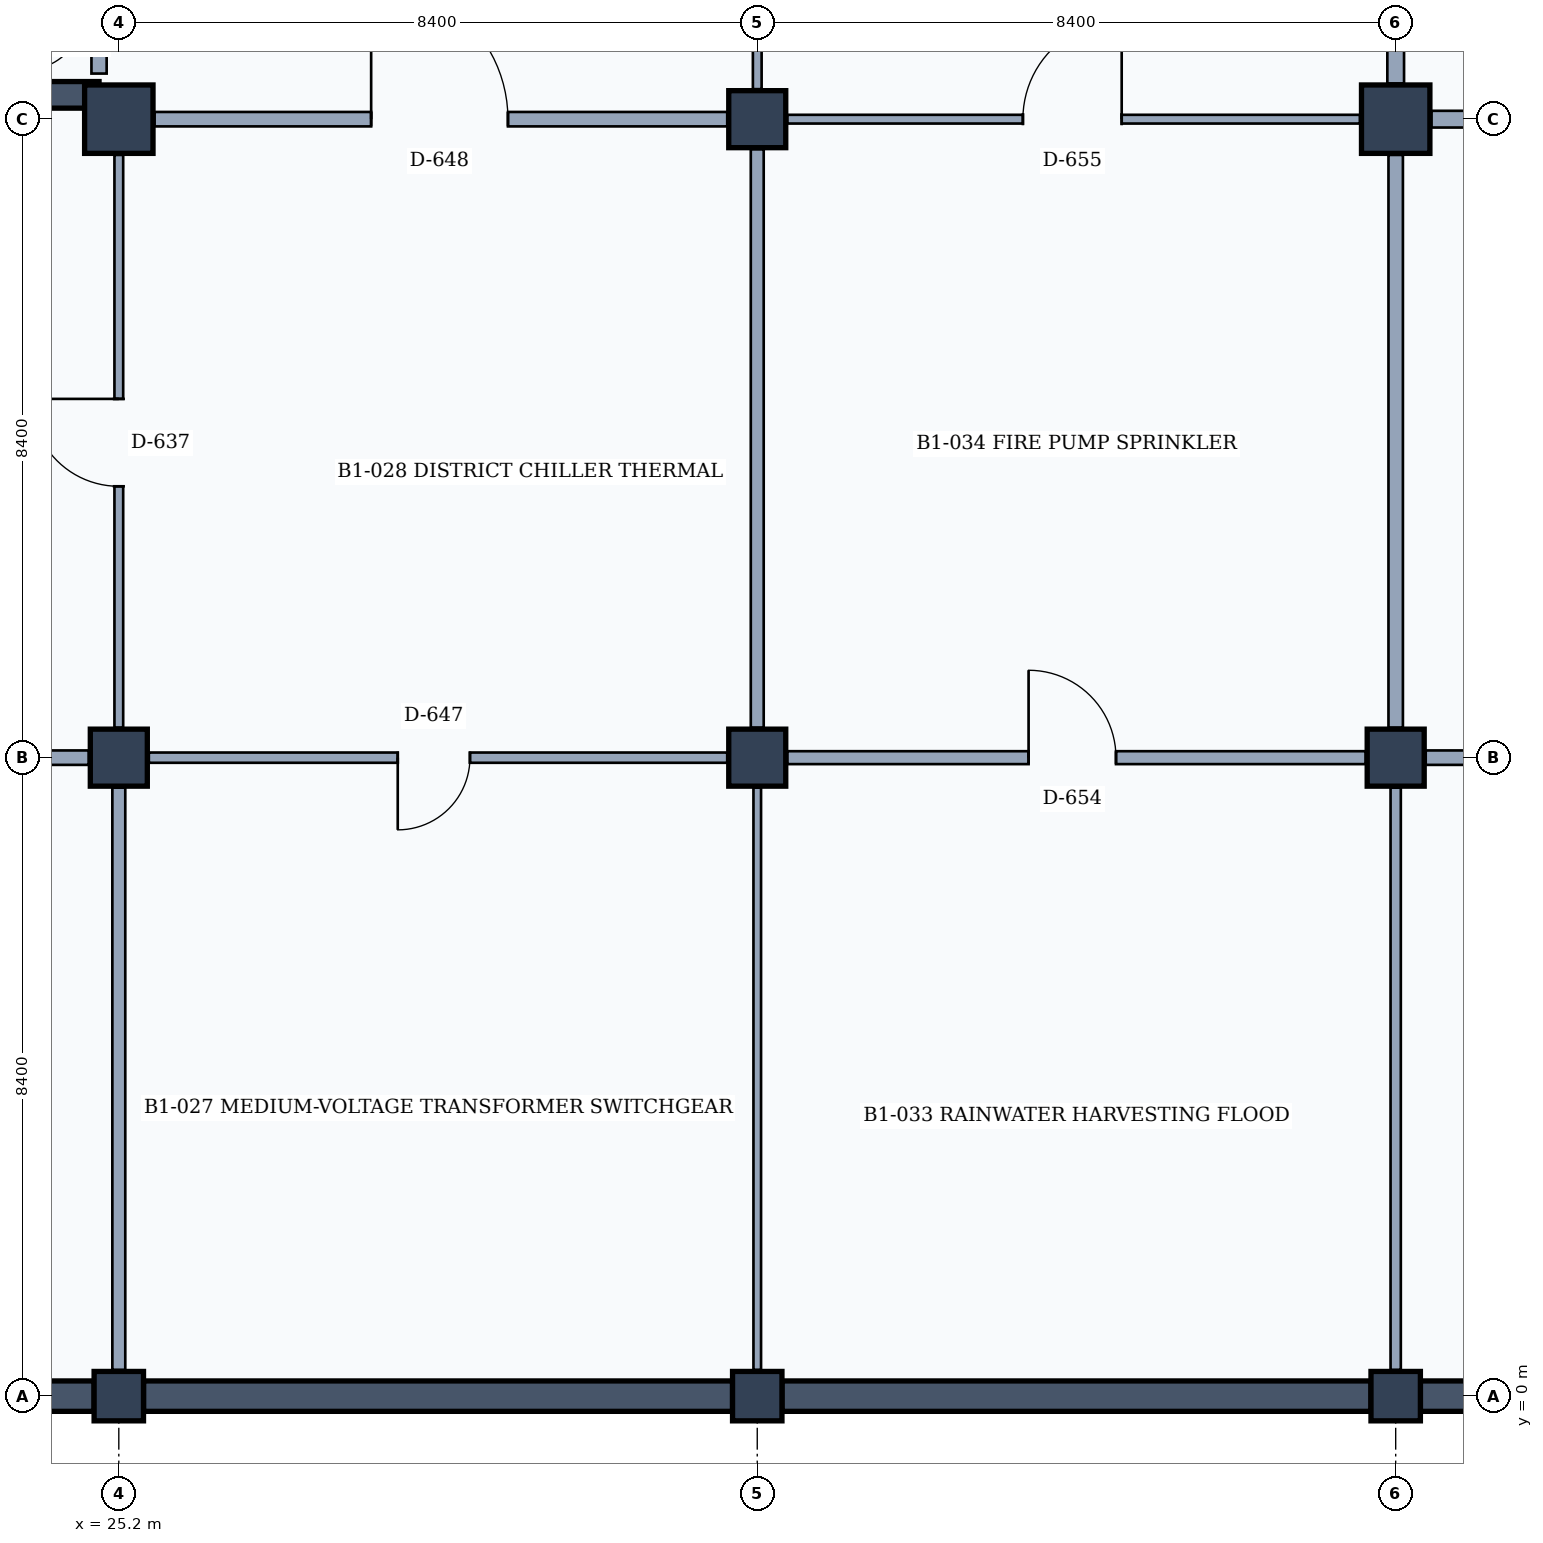
"""IFC4 building model, lengths in metres.
Left out: names, types, materials, properties, quantities, classifications, styles, units other than length and angle.
Written with IfcOpenShell. Run it as: python <this file> out.ifc"""

import sys

from ifc_helpers import new_model, si_unit, direction, frame, frame_2d, origin, origin_2d, place, context, subcontext, project, spatial, rectangle, extrude, element, fill, save


model = new_model("IFC4")
c1 = context("Model", 3, precision=1e-05, world=origin(), true_north=direction((0.0, 1.0)))
c2 = subcontext(c1, "Body", "Model", "MODEL_VIEW")
j1 = project(units=[si_unit("LENGTHUNIT", "METRE"), si_unit("PLANEANGLEUNIT", "RADIAN")], contexts=[c1])
p1 = place(None, origin())
s1 = spatial("IfcSite", under=j1, at=p1, CompositionType="ELEMENT")
p2 = place(p1, origin())
s2 = spatial("IfcBuilding", under=s1, at=p2, CompositionType="ELEMENT")
p3 = place(p2, frame((0.0, 0.0, -4.2)))
s3 = spatial("IfcBuildingStorey", under=s2, at=p3, CompositionType="ELEMENT", Elevation=-4.2)
p4 = place(p3, frame((25.2, 0.0, 0.0), z_axis=(0.0, 0.0, 1.0), x_axis=(1.0, 0.0, 0.0)))
e1 = element("IfcColumn", 1, at=p4, inside=s3, PredefinedType="COLUMN", context=c2, shape_type="SweptSolid", body=[
    extrude(rectangle(XDim=0.65, YDim=0.65, at=origin_2d()), origin(), (0.0, 0.0, 1.0), 4.2),
])
p5 = place(p3, frame((25.2, 8.4, 0.0), z_axis=(0.0, 0.0, 1.0), x_axis=(1.0, 0.0, 0.0)))
e2 = element("IfcColumn", 2, at=p5, inside=s3, PredefinedType="COLUMN", context=c2, shape_type="SweptSolid", body=[
    extrude(rectangle(XDim=0.75, YDim=0.75, at=origin_2d()), origin(), (0.0, 0.0, 1.0), 4.2),
])
p6 = place(p3, frame((25.2, 16.8, 0.0), z_axis=(0.0, 0.0, 1.0), x_axis=(1.0, 0.0, 0.0)))
e3 = element("IfcColumn", 3, at=p6, inside=s3, PredefinedType="COLUMN", context=c2, shape_type="SweptSolid", body=[
    extrude(rectangle(XDim=0.9, YDim=0.9, at=origin_2d()), origin(), (0.0, 0.0, 1.0), 4.2),
])
p7 = place(p3, frame((33.6, 0.0, 0.0), z_axis=(0.0, 0.0, 1.0), x_axis=(1.0, 0.0, 0.0)))
e4 = element("IfcColumn", 4, at=p7, inside=s3, PredefinedType="COLUMN", context=c2, shape_type="SweptSolid", body=[
    extrude(rectangle(XDim=0.65, YDim=0.65, at=origin_2d()), origin(), (0.0, 0.0, 1.0), 4.2),
])
for number, where, z_axis, x_axis in (
    (5, (33.6, 8.4, 0.0), (0.0, 0.0, 1.0), (1.0, 0.0, 0.0)),
    (6, (33.6, 16.8, 0.0), (0.0, 0.0, 1.0), (1.0, 0.0, 0.0)),
):
    element("IfcColumn", number, at=place(p3, frame(where, z_axis=z_axis, x_axis=x_axis)), inside=s3, PredefinedType="COLUMN", context=c2, shape_type="SweptSolid", body=[
        extrude(rectangle(XDim=0.75, YDim=0.75, at=origin_2d()), origin(), (0.0, 0.0, 1.0), 4.2),
    ])
p8 = place(p3, frame((42.0, 0.0, 0.0), z_axis=(0.0, 0.0, 1.0), x_axis=(1.0, 0.0, 0.0)))
e7 = element("IfcColumn", 7, at=p8, inside=s3, PredefinedType="COLUMN", context=c2, shape_type="SweptSolid", body=[
    extrude(rectangle(XDim=0.65, YDim=0.65, at=origin_2d()), origin(), (0.0, 0.0, 1.0), 4.2),
])
p9 = place(p3, frame((42.0, 8.4, 0.0), z_axis=(0.0, 0.0, 1.0), x_axis=(1.0, 0.0, 0.0)))
e8 = element("IfcColumn", 8, at=p9, inside=s3, PredefinedType="COLUMN", context=c2, shape_type="SweptSolid", body=[
    extrude(rectangle(XDim=0.75, YDim=0.75, at=origin_2d()), origin(), (0.0, 0.0, 1.0), 4.2),
])
p10 = place(p3, frame((42.0, 16.8, 0.0), z_axis=(0.0, 0.0, 1.0), x_axis=(1.0, 0.0, 0.0)))
e9 = element("IfcColumn", 9, at=p10, inside=s3, PredefinedType="COLUMN", context=c2, shape_type="SweptSolid", body=[
    extrude(rectangle(XDim=0.9, YDim=0.9, at=origin_2d()), origin(), (0.0, 0.0, 1.0), 4.2),
])
for number, where, z_axis, x_axis in (
    (10, (24.875, 0.0, 0.0), (0.0, 0.0, 1.0), (-1.0, 0.0, 0.0)),
    (11, (33.275, 0.0, 0.0), (0.0, 0.0, 1.0), (-1.0, 0.0, 0.0)),
    (12, (41.675, 0.0, 0.0), (0.0, 0.0, 1.0), (-1.0, 0.0, 0.0)),
    (13, (50.075, 0.0, 0.0), (0.0, 0.0, 1.0), (-1.0, 0.0, 0.0)),
):
    element("IfcWall", number, at=place(p3, frame(where, z_axis=z_axis, x_axis=x_axis)), inside=s3, PredefinedType="STANDARD", context=c2, shape_type="SweptSolid", body=[
        extrude(rectangle(XDim=7.75, YDim=0.4, at=frame_2d((3.875, 0.0))), origin(), (0.0, 0.0, 1.0), 3.88),
    ])
p11 = place(p3, frame((24.94, 24.6, 0.0), z_axis=(0.0, 0.0, 1.0), x_axis=(0.0, -1.0, 0.0)))
e14 = element("IfcWall", 14, at=p11, inside=s3, PredefinedType="PARTITIONING", context=c2, shape_type="SweptSolid", body=[
    extrude(rectangle(XDim=7.2, YDim=0.2, at=frame_2d((3.6, 0.0))), origin(), (0.0, 0.0, 1.0), 3.25),
])
p12 = place(p11, frame((3.55, 0.0, 0.0)))
e15 = element("IfcOpeningElement", 15, at=p12, cuts=e14, PredefinedType="OPENING", context=c2, shape_type="SweptSolid", body=[
    extrude(rectangle(XDim=1.1, YDim=2.15, at=frame_2d((0.55, 1.075))), frame((0.0, 0.11, 0.0), z_axis=(0.0, -1.0, 0.0), x_axis=(1.0, 0.0, 0.0)), (0.0, 0.0, 1.0), 0.22),
])
p13 = place(p3, frame((24.94, 17.12, 0.0), z_axis=(0.0, 0.0, 1.0), x_axis=(-1.0, 0.0, 0.0)))
e16 = element("IfcWall", 16, at=p13, inside=s3, PredefinedType="SHEAR", context=c2, shape_type="SweptSolid", body=[
    extrude(rectangle(XDim=7.9, YDim=0.35, at=frame_2d((3.95, 0.0))), origin(), (0.0, 0.0, 1.0), 3.9),
])
p14 = place(p3, frame((25.2, 0.345, 0.0), z_axis=(0.0, 0.0, 1.0), x_axis=(0.0, 1.0, 0.0)))
e17 = element("IfcWall", 17, at=p14, inside=s3, PredefinedType="PARTITIONING", context=c2, shape_type="SweptSolid", body=[
    extrude(rectangle(XDim=7.66, YDim=0.17, at=frame_2d((3.83, 0.0))), origin(), (0.0, 0.0, 1.0), 3.25),
])
p15 = place(p3, frame((17.195, 8.4, 0.0), z_axis=(0.0, 0.0, 1.0), x_axis=(1.0, 0.0, 0.0)))
e18 = element("IfcWall", 18, at=p15, inside=s3, PredefinedType="PARTITIONING", context=c2, shape_type="SweptSolid", body=[
    extrude(rectangle(XDim=7.61, YDim=0.19, at=frame_2d((3.805, 0.0))), origin(), (0.0, 0.0, 1.0), 3.05),
])
p16 = place(p15, frame((3.225, 0.0, 0.0)))
e19 = element("IfcOpeningElement", 19, at=p16, cuts=e18, PredefinedType="OPENING", context=c2, shape_type="SweptSolid", body=[
    extrude(rectangle(XDim=1.05, YDim=2.2, at=frame_2d((0.525, 1.1))), frame((0.0, 0.105, 0.0), z_axis=(0.0, -1.0, 0.0), x_axis=(1.0, 0.0, 0.0)), (0.0, 0.0, 1.0), 0.21),
])
p17 = place(p3, frame((25.2, 8.795, 0.0), z_axis=(0.0, 0.0, 1.0), x_axis=(0.0, 1.0, 0.0)))
e20 = element("IfcWall", 20, at=p17, inside=s3, PredefinedType="PARTITIONING", context=c2, shape_type="SweptSolid", body=[
    extrude(rectangle(XDim=7.535, YDim=0.115, at=frame_2d((3.768, 0.0))), origin(), (0.0, 0.0, 1.0), 3.25),
])
p18 = place(p17, frame((3.175, 0.0, 0.0)))
e21 = element("IfcOpeningElement", 21, at=p18, cuts=e20, PredefinedType="OPENING", context=c2, shape_type="SweptSolid", body=[
    extrude(rectangle(XDim=1.15, YDim=2.25, at=frame_2d((0.575, 1.125))), frame((0.0, 0.067, 0.0), z_axis=(0.0, -1.0, 0.0), x_axis=(1.0, 0.0, 0.0)), (0.0, 0.0, 1.0), 0.135),
])
p19 = place(p3, frame((33.6, 0.345, 0.0), z_axis=(0.0, 0.0, 1.0), x_axis=(0.0, 1.0, 0.0)))
e22 = element("IfcWall", 22, at=p19, inside=s3, PredefinedType="MOVABLE", context=c2, shape_type="SweptSolid", body=[
    extrude(rectangle(XDim=7.66, YDim=0.1, at=frame_2d((3.83, 0.0))), origin(), (0.0, 0.0, 1.0), 3.25),
])
p20 = place(p3, frame((25.595, 8.4, 0.0), z_axis=(0.0, 0.0, 1.0), x_axis=(1.0, 0.0, 0.0)))
e23 = element("IfcWall", 23, at=p20, inside=s3, PredefinedType="PARTITIONING", context=c2, shape_type="SweptSolid", body=[
    extrude(rectangle(XDim=7.61, YDim=0.135, at=frame_2d((3.805, 0.0))), origin(), (0.0, 0.0, 1.0), 3.05),
])
p21 = place(p20, frame((3.275, 0.0, 0.0)))
e24 = element("IfcOpeningElement", 24, at=p21, cuts=e23, PredefinedType="OPENING", context=c2, shape_type="SweptSolid", body=[
    extrude(rectangle(XDim=0.95, YDim=2.15, at=frame_2d((0.475, 1.075))), frame((0.0, 0.077, 0.0), z_axis=(0.0, -1.0, 0.0), x_axis=(1.0, 0.0, 0.0)), (0.0, 0.0, 1.0), 0.155),
])
p22 = place(p3, frame((33.6, 8.795, 0.0), z_axis=(0.0, 0.0, 1.0), x_axis=(0.0, 1.0, 0.0)))
e25 = element("IfcWall", 25, at=p22, inside=s3, PredefinedType="PARTITIONING", context=c2, shape_type="SweptSolid", body=[
    extrude(rectangle(XDim=7.61, YDim=0.17, at=frame_2d((3.805, 0.0))), origin(), (0.0, 0.0, 1.0), 3.25),
])
p23 = place(p3, frame((25.67, 16.8, 0.0), z_axis=(0.0, 0.0, 1.0), x_axis=(1.0, 0.0, 0.0)))
e26 = element("IfcWall", 26, at=p23, inside=s3, PredefinedType="PARTITIONING", context=c2, shape_type="SweptSolid", body=[
    extrude(rectangle(XDim=7.535, YDim=0.19, at=frame_2d((3.768, 0.0))), origin(), (0.0, 0.0, 1.0), 3.05),
])
p24 = place(p23, frame((2.85, 0.0, 0.0)))
e27 = element("IfcOpeningElement", 27, at=p24, cuts=e26, PredefinedType="OPENING", context=c2, shape_type="SweptSolid", body=[
    extrude(rectangle(XDim=1.8, YDim=2.3, at=frame_2d((0.9, 1.15))), frame((0.0, 0.105, 0.0), z_axis=(0.0, -1.0, 0.0), x_axis=(1.0, 0.0, 0.0)), (0.0, 0.0, 1.0), 0.21),
])
p25 = place(p3, frame((33.6, 17.195, 0.0), z_axis=(0.0, 0.0, 1.0), x_axis=(0.0, 1.0, 0.0)))
e28 = element("IfcWall", 28, at=p25, inside=s3, PredefinedType="PARTITIONING", context=c2, shape_type="SweptSolid", body=[
    extrude(rectangle(XDim=7.61, YDim=0.115, at=frame_2d((3.805, 0.0))), origin(), (0.0, 0.0, 1.0), 3.25),
])
p26 = place(p25, frame((3.15, 0.0, 0.0)))
e29 = element("IfcOpeningElement", 29, at=p26, cuts=e28, PredefinedType="OPENING", context=c2, shape_type="SweptSolid", body=[
    extrude(rectangle(XDim=1.2, YDim=2.2, at=frame_2d((0.6, 1.1))), frame((0.0, 0.067, 0.0), z_axis=(0.0, -1.0, 0.0), x_axis=(1.0, 0.0, 0.0)), (0.0, 0.0, 1.0), 0.135),
])
p27 = place(p3, frame((42.0, 0.345, 0.0), z_axis=(0.0, 0.0, 1.0), x_axis=(0.0, 1.0, 0.0)))
e30 = element("IfcWall", 30, at=p27, inside=s3, PredefinedType="PARTITIONING", context=c2, shape_type="SweptSolid", body=[
    extrude(rectangle(XDim=7.66, YDim=0.135, at=frame_2d((3.83, 0.0))), origin(), (0.0, 0.0, 1.0), 3.25),
])
p28 = place(p3, frame((33.995, 8.4, 0.0), z_axis=(0.0, 0.0, 1.0), x_axis=(1.0, 0.0, 0.0)))
e31 = element("IfcWall", 31, at=p28, inside=s3, PredefinedType="PARTITIONING", context=c2, shape_type="SweptSolid", body=[
    extrude(rectangle(XDim=7.61, YDim=0.17, at=frame_2d((3.805, 0.0))), origin(), (0.0, 0.0, 1.0), 3.05),
])
p29 = place(p28, frame((3.175, 0.0, 0.0)))
e32 = element("IfcOpeningElement", 32, at=p29, cuts=e31, PredefinedType="OPENING", context=c2, shape_type="SweptSolid", body=[
    extrude(rectangle(XDim=1.15, YDim=2.25, at=frame_2d((0.575, 1.125))), frame((0.0, 0.095, 0.0), z_axis=(0.0, -1.0, 0.0), x_axis=(1.0, 0.0, 0.0)), (0.0, 0.0, 1.0), 0.19),
])
p30 = place(p3, frame((42.0, 8.795, 0.0), z_axis=(0.0, 0.0, 1.0), x_axis=(0.0, 1.0, 0.0)))
e33 = element("IfcWall", 33, at=p30, inside=s3, PredefinedType="PARTITIONING", context=c2, shape_type="SweptSolid", body=[
    extrude(rectangle(XDim=7.535, YDim=0.19, at=frame_2d((3.768, 0.0))), origin(), (0.0, 0.0, 1.0), 3.25),
])
p31 = place(p3, frame((33.995, 16.8, 0.0), z_axis=(0.0, 0.0, 1.0), x_axis=(1.0, 0.0, 0.0)))
e34 = element("IfcWall", 34, at=p31, inside=s3, PredefinedType="PARTITIONING", context=c2, shape_type="SweptSolid", body=[
    extrude(rectangle(XDim=7.535, YDim=0.115, at=frame_2d((3.768, 0.0))), origin(), (0.0, 0.0, 1.0), 3.05),
])
p32 = place(p31, frame((3.1, 0.0, 0.0)))
e35 = element("IfcOpeningElement", 35, at=p32, cuts=e34, PredefinedType="OPENING", context=c2, shape_type="SweptSolid", body=[
    extrude(rectangle(XDim=1.3, YDim=2.2, at=frame_2d((0.65, 1.1))), frame((0.0, 0.067, 0.0), z_axis=(0.0, -1.0, 0.0), x_axis=(1.0, 0.0, 0.0)), (0.0, 0.0, 1.0), 0.135),
])
p33 = place(p3, frame((42.0, 17.27, 0.0), z_axis=(0.0, 0.0, 1.0), x_axis=(0.0, 1.0, 0.0)))
e36 = element("IfcWall", 36, at=p33, inside=s3, PredefinedType="PARTITIONING", context=c2, shape_type="SweptSolid", body=[
    extrude(rectangle(XDim=7.535, YDim=0.22, at=frame_2d((3.768, 0.0))), origin(), (0.0, 0.0, 1.0), 3.25),
])
p34 = place(p33, frame((2.975, 0.0, 0.0)))
e37 = element("IfcOpeningElement", 37, at=p34, cuts=e36, PredefinedType="OPENING", context=c2, shape_type="SweptSolid", body=[
    extrude(rectangle(XDim=1.55, YDim=2.35, at=frame_2d((0.775, 1.175))), frame((0.0, 0.12, 0.0), z_axis=(0.0, -1.0, 0.0), x_axis=(1.0, 0.0, 0.0)), (0.0, 0.0, 1.0), 0.24),
])
p35 = place(p3, frame((42.395, 8.4, 0.0), z_axis=(0.0, 0.0, 1.0), x_axis=(1.0, 0.0, 0.0)))
e38 = element("IfcWall", 38, at=p35, inside=s3, PredefinedType="PARTITIONING", context=c2, shape_type="SweptSolid", body=[
    extrude(rectangle(XDim=7.61, YDim=0.19, at=frame_2d((3.805, 0.0))), origin(), (0.0, 0.0, 1.0), 3.05),
])
p36 = place(p35, frame((3.25, 0.0, 0.0)))
e39 = element("IfcOpeningElement", 39, at=p36, cuts=e38, PredefinedType="OPENING", context=c2, shape_type="SweptSolid", body=[
    extrude(rectangle(XDim=1.0, YDim=2.15, at=frame_2d((0.5, 1.075))), frame((0.0, 0.105, 0.0), z_axis=(0.0, -1.0, 0.0), x_axis=(1.0, 0.0, 0.0)), (0.0, 0.0, 1.0), 0.21),
])
p37 = place(p3, frame((42.47, 16.8, 0.0), z_axis=(0.0, 0.0, 1.0), x_axis=(1.0, 0.0, 0.0)))
e40 = element("IfcWall", 40, at=p37, inside=s3, PredefinedType="PARTITIONING", context=c2, shape_type="SweptSolid", body=[
    extrude(rectangle(XDim=7.535, YDim=0.22, at=frame_2d((3.768, 0.0))), origin(), (0.0, 0.0, 1.0), 3.05),
])
p38 = place(p37, frame((3.275, 0.0, 0.0)))
e41 = element("IfcOpeningElement", 41, at=p38, cuts=e40, PredefinedType="OPENING", context=c2, shape_type="SweptSolid", body=[
    extrude(rectangle(XDim=0.95, YDim=2.15, at=frame_2d((0.475, 1.075))), frame((0.0, 0.12, 0.0), z_axis=(0.0, -1.0, 0.0), x_axis=(1.0, 0.0, 0.0)), (0.0, 0.0, 1.0), 0.24),
])
p39 = place(p18, origin())
e42 = element("IfcDoor", 42, at=p39, inside=s3, OperationType="SINGLE_SWING_RIGHT", PredefinedType="DOOR", context=c2, shape_type="SweptSolid", body=[
    extrude(rectangle(XDim=1.15, YDim=2.25, at=frame_2d((0.575, 1.125))), frame((0.0, 0.025, 0.0), z_axis=(0.0, -1.0, 0.0), x_axis=(1.0, 0.0, 0.0)), (0.0, 0.0, 1.0), 0.05),
])
fill(e21, e42)
p40 = place(p21, frame((0.95, 0.0, 0.0), z_axis=(0.0, 0.0, 1.0), x_axis=(-1.0, 0.0, 0.0)))
e43 = element("IfcDoor", 43, at=p40, inside=s3, OperationType="SINGLE_SWING_RIGHT", PredefinedType="DOOR", context=c2, shape_type="SweptSolid", body=[
    extrude(rectangle(XDim=0.95, YDim=2.15, at=frame_2d((0.475, 1.075))), frame((0.0, 0.025, 0.0), z_axis=(0.0, -1.0, 0.0), x_axis=(1.0, 0.0, 0.0)), (0.0, 0.0, 1.0), 0.05),
])
fill(e24, e43)
p41 = place(p24, origin())
e44 = element("IfcDoor", 44, at=p41, inside=s3, OperationType="SINGLE_SWING_LEFT", PredefinedType="DOOR", context=c2, shape_type="SweptSolid", body=[
    extrude(rectangle(XDim=1.8, YDim=2.3, at=frame_2d((0.9, 1.15))), frame((0.0, 0.025, 0.0), z_axis=(0.0, -1.0, 0.0), x_axis=(1.0, 0.0, 0.0)), (0.0, 0.0, 1.0), 0.05),
])
fill(e27, e44)
p42 = place(p29, origin())
e45 = element("IfcDoor", 45, at=p42, inside=s3, OperationType="SINGLE_SWING_LEFT", PredefinedType="DOOR", context=c2, shape_type="SweptSolid", body=[
    extrude(rectangle(XDim=1.15, YDim=2.25, at=frame_2d((0.575, 1.125))), frame((0.0, 0.025, 0.0), z_axis=(0.0, -1.0, 0.0), x_axis=(1.0, 0.0, 0.0)), (0.0, 0.0, 1.0), 0.05),
])
fill(e32, e45)
p43 = place(p32, origin())
e46 = element("IfcDoor", 46, at=p43, inside=s3, OperationType="SINGLE_SWING_RIGHT", PredefinedType="DOOR", context=c2, shape_type="SweptSolid", body=[
    extrude(rectangle(XDim=1.3, YDim=2.2, at=frame_2d((0.65, 1.1))), frame((0.0, 0.025, 0.0), z_axis=(0.0, -1.0, 0.0), x_axis=(1.0, 0.0, 0.0)), (0.0, 0.0, 1.0), 0.05),
])
fill(e35, e46)
save(model, sys.argv[1])
